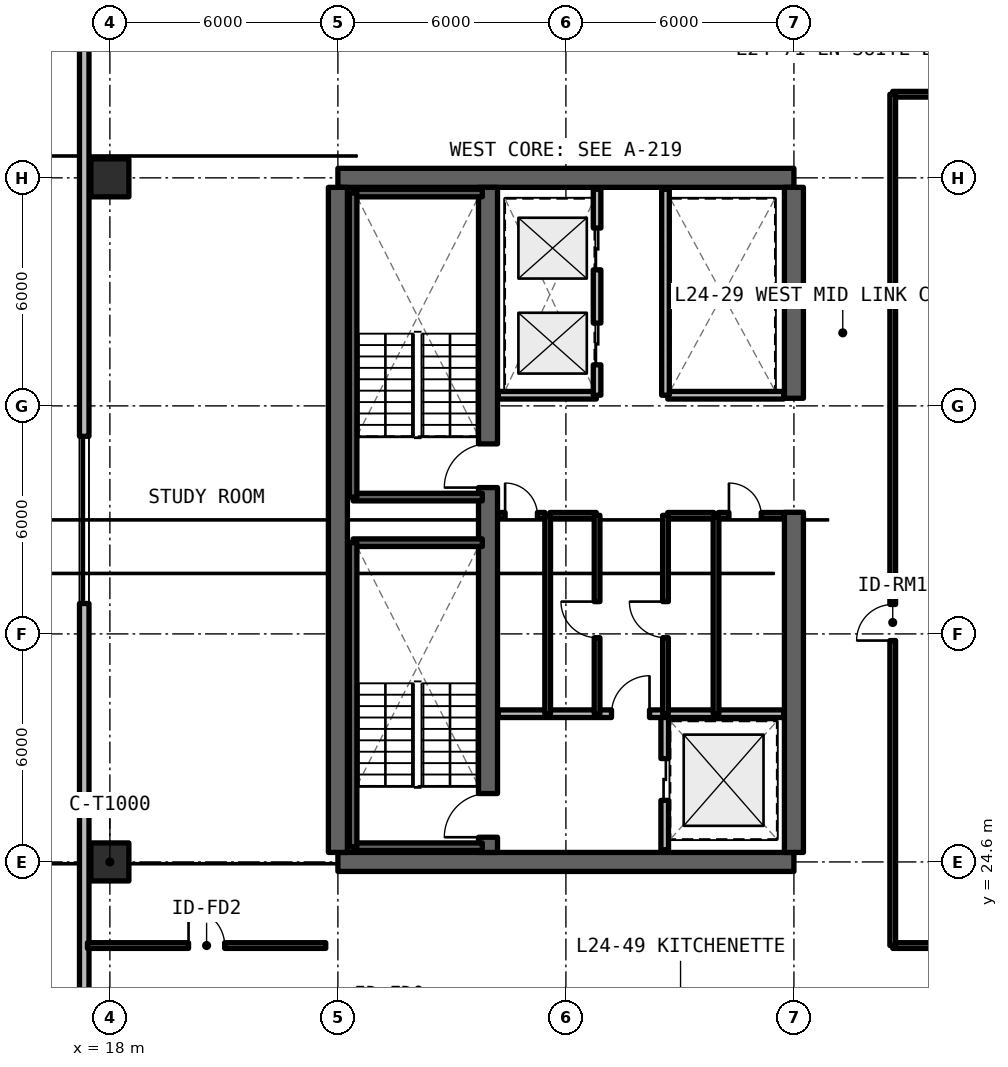
"""IFC4 building model, lengths in metres.
Left out: names, types, materials, properties, quantities, classifications, styles, units other than length and angle.
Written with IfcOpenShell. Run it as: python <this file> out.ifc"""

import sys

from ifc_helpers import new_model, si_unit, direction, frame, frame_2d, origin, origin_2d, place, context, subcontext, project, spatial, rectangle, extrude, element, fill, save


model = new_model("IFC4")
c1 = context("Model", 3, precision=1e-05, world=origin(), true_north=direction((0.0, 1.0)))
c2 = subcontext(c1, "Body", "Model", "MODEL_VIEW")
j1 = project(units=[si_unit("LENGTHUNIT", "METRE"), si_unit("PLANEANGLEUNIT", "RADIAN")], contexts=[c1])
p1 = place(None, origin())
s1 = spatial("IfcSite", under=j1, at=p1, CompositionType="ELEMENT")
p2 = place(p1, origin())
s2 = spatial("IfcBuilding", under=s1, at=p2, CompositionType="ELEMENT")
p3 = place(p2, frame((0.0, 0.0, 88.77)))
s3 = spatial("IfcBuildingStorey", under=s2, at=p3, CompositionType="ELEMENT", Elevation=88.77)
for number, where, z_axis, x_axis in (
    (1, (24.0, 24.6, 0.0), (0.0, 0.0, 1.0), (1.0, 0.0, 0.0)),
    (2, (36.0, 42.6, 0.0), (0.0, 0.0, 1.0), (-1.0, 0.0, 0.0)),
):
    element("IfcWall", number, at=place(p3, frame(where, z_axis=z_axis, x_axis=x_axis)), inside=s3, PredefinedType="SHEAR", context=c2, shape_type="SweptSolid", body=[
        extrude(rectangle(XDim=12.0, YDim=0.5, at=frame_2d((6.0, 0.0))), origin(), (0.0, 0.0, 1.0), 3.3),
    ])
p4 = place(p3, frame((24.0, 24.85, 0.0), z_axis=(0.0, 0.0, 1.0), x_axis=(0.0, 1.0, 0.0)))
e3 = element("IfcWall", 3, at=p4, inside=s3, PredefinedType="SHEAR", context=c2, shape_type="SweptSolid", body=[
    extrude(rectangle(XDim=17.5, YDim=0.5, at=frame_2d((8.75, 0.0))), origin(), (0.0, 0.0, 1.0), 3.3),
])
p5 = place(p3, frame((36.0, 24.85, 0.0), z_axis=(0.0, 0.0, 1.0), x_axis=(0.0, 1.0, 0.0)))
e4 = element("IfcWall", 4, at=p5, inside=s3, PredefinedType="SHEAR", context=c2, shape_type="SweptSolid", body=[
    extrude(rectangle(XDim=8.95, YDim=0.5, at=frame_2d((4.475, 0.0))), origin(), (0.0, 0.0, 1.0), 3.3),
])
p6 = place(p3, frame((36.0, 36.8, 0.0), z_axis=(0.0, 0.0, 1.0), x_axis=(0.0, 1.0, 0.0)))
e5 = element("IfcWall", 5, at=p6, inside=s3, PredefinedType="SHEAR", context=c2, shape_type="SweptSolid", body=[
    extrude(rectangle(XDim=5.55, YDim=0.5, at=frame_2d((2.775, 0.0))), origin(), (0.0, 0.0, 1.0), 3.3),
])
p7 = place(p3, frame((27.95, 24.85, 0.0), z_axis=(0.0, 0.0, 1.0), x_axis=(0.0, 1.0, 0.0)))
e6 = element("IfcWall", 6, at=p7, inside=s3, PredefinedType="SHEAR", context=c2, shape_type="SweptSolid", body=[
    extrude(rectangle(XDim=17.5, YDim=0.5, at=frame_2d((8.75, 0.0))), origin(), (0.0, 0.0, 1.0), 3.3),
])
p8 = place(p7, frame((0.4, 0.0, 0.0)))
e7 = element("IfcOpeningElement", 7, at=p8, cuts=e6, PredefinedType="OPENING", context=c2, shape_type="SweptSolid", body=[
    extrude(rectangle(XDim=1.15, YDim=2.15, at=frame_2d((0.575, 1.075))), frame((0.0, 0.26, 0.0), z_axis=(0.0, -1.0, 0.0), x_axis=(1.0, 0.0, 0.0)), (0.0, 0.0, 1.0), 0.52),
])
p9 = place(p7, frame((9.6, 0.0, 0.0)))
e8 = element("IfcOpeningElement", 8, at=p9, cuts=e6, PredefinedType="OPENING", context=c2, shape_type="SweptSolid", body=[
    extrude(rectangle(XDim=1.15, YDim=2.15, at=frame_2d((0.575, 1.075))), frame((0.0, 0.26, 0.0), z_axis=(0.0, -1.0, 0.0), x_axis=(1.0, 0.0, 0.0)), (0.0, 0.0, 1.0), 0.52),
])
for number, where, z_axis, x_axis in (
    (9, (18.0, 24.6, 0.0), (0.0, 0.0, 1.0), (1.0, 0.0, 0.0)),
    (10, (18.0, 42.6, 0.0), (0.0, 0.0, 1.0), (1.0, 0.0, 0.0)),
):
    element("IfcColumn", number, at=place(p3, frame(where, z_axis=z_axis, x_axis=x_axis)), inside=s3, PredefinedType="COLUMN", context=c2, shape_type="SweptSolid", body=[
        extrude(rectangle(XDim=1.0, YDim=1.0, at=origin_2d()), origin(), (0.0, 0.0, 1.0), 3.3),
    ])
p10 = place(p3, frame((17.325, 53.348, 0.0), z_axis=(0.0, 0.0, 1.0), x_axis=(0.0, -1.0, 0.0)))
e11 = element("IfcWall", 11, at=p10, inside=s3, PredefinedType="SOLIDWALL", context=c2, shape_type="SweptSolid", body=[
    extrude(rectangle(XDim=39.496, YDim=0.25, at=frame_2d((19.748, 0.0))), origin(), (0.0, 0.0, 1.0), 3.08),
])
p11 = place(p10, frame((1.698, 0.0, 0.0)))
e12 = element("IfcOpeningElement", 12, at=p11, cuts=e11, PredefinedType="OPENING", context=c2, shape_type="SweptSolid", body=[
    extrude(rectangle(XDim=1.1, YDim=2.15, at=frame_2d((0.55, 1.075))), frame((0.0, 0.135, 0.0), z_axis=(0.0, -1.0, 0.0), x_axis=(1.0, 0.0, 0.0)), (0.0, 0.0, 1.0), 0.27),
])
p12 = place(p10, frame((17.548, 0.0, 0.78)))
e13 = element("IfcOpeningElement", 13, at=p12, cuts=e11, PredefinedType="OPENING", context=c2, shape_type="SweptSolid", body=[
    extrude(rectangle(XDim=4.4, YDim=1.66, at=frame_2d((2.2, 0.83))), frame((0.0, 0.135, 0.0), z_axis=(0.0, -1.0, 0.0), x_axis=(1.0, 0.0, 0.0)), (0.0, 0.0, 1.0), 0.27),
])
p13 = place(p10, frame((35.642, 0.0, 0.78)))
e14 = element("IfcOpeningElement", 14, at=p13, cuts=e11, PredefinedType="OPENING", context=c2, shape_type="SweptSolid", body=[
    extrude(rectangle(XDim=1.4, YDim=1.65, at=frame_2d((0.7, 0.825))), frame((0.0, 0.135, 0.0), z_axis=(0.0, -1.0, 0.0), x_axis=(1.0, 0.0, 0.0)), (0.0, 0.0, 1.0), 0.27),
])
p14 = place(p3, frame((32.6, 24.92, 0.0), z_axis=(0.0, 0.0, 1.0), x_axis=(0.0, 1.0, 0.0)))
e15 = element("IfcWall", 15, at=p14, inside=s3, PredefinedType="SOLIDWALL", context=c2, shape_type="SweptSolid", body=[
    extrude(rectangle(XDim=3.58, YDim=0.2, at=frame_2d((1.79, 0.0))), origin(), (0.0, 0.0, 1.0), 2.35),
])
p15 = place(p14, frame((1.3, 0.0, 0.0)))
e16 = element("IfcOpeningElement", 16, at=p15, cuts=e15, PredefinedType="OPENING", context=c2, shape_type="SweptSolid", body=[
    extrude(rectangle(XDim=1.1, YDim=2.2, at=frame_2d((0.55, 1.1))), frame((0.0, 0.11, 0.0), z_axis=(0.0, -1.0, 0.0), x_axis=(1.0, 0.0, 0.0)), (0.0, 0.0, 1.0), 0.22),
])
p16 = place(p3, frame((28.22, 28.5, 0.0), z_axis=(0.0, 0.0, 1.0), x_axis=(1.0, 0.0, 0.0)))
e17 = element("IfcWall", 17, at=p16, inside=s3, PredefinedType="SOLIDWALL", context=c2, shape_type="SweptSolid", body=[
    extrude(rectangle(XDim=7.51, YDim=0.2, at=frame_2d((3.755, 0.0))), origin(), (0.0, 0.0, 1.0), 2.35),
])
p17 = place(p16, frame((2.98, 0.0, 0.0)))
e18 = element("IfcOpeningElement", 18, at=p17, cuts=e17, PredefinedType="OPENING", context=c2, shape_type="SweptSolid", body=[
    extrude(rectangle(XDim=1.0, YDim=2.15, at=frame_2d((0.5, 1.075))), frame((0.0, 0.11, 0.0), z_axis=(0.0, -1.0, 0.0), x_axis=(1.0, 0.0, 0.0)), (0.0, 0.0, 1.0), 0.22),
])
p18 = place(p3, frame((29.52, 28.5, 0.0), z_axis=(0.0, 0.0, 1.0), x_axis=(0.0, 1.0, 0.0)))
e19 = element("IfcWall", 19, at=p18, inside=s3, PredefinedType="SOLIDWALL", context=c2, shape_type="SweptSolid", body=[
    extrude(rectangle(XDim=5.22, YDim=0.15, at=frame_2d((2.61, 0.0))), origin(), (0.0, 0.0, 1.0), 2.35),
])
p19 = place(p3, frame((28.22, 33.72, 0.0), z_axis=(0.0, 0.0, 1.0), x_axis=(1.0, 0.0, 0.0)))
e20 = element("IfcWall", 20, at=p19, inside=s3, PredefinedType="SOLIDWALL", context=c2, shape_type="SweptSolid", body=[
    extrude(rectangle(XDim=1.23, YDim=0.15, at=frame_2d((0.615, 0.0))), origin(), (0.0, 0.0, 1.0), 2.35),
])
p20 = place(p19, frame((0.18, 0.0, 0.0)))
e21 = element("IfcOpeningElement", 21, at=p20, cuts=e20, PredefinedType="OPENING", context=c2, shape_type="SweptSolid", body=[
    extrude(rectangle(XDim=0.85, YDim=2.1, at=frame_2d((0.425, 1.05))), frame((0.0, 0.085, 0.0), z_axis=(0.0, -1.0, 0.0), x_axis=(1.0, 0.0, 0.0)), (0.0, 0.0, 1.0), 0.17),
])
p21 = place(p3, frame((29.58, 33.72, 0.0), z_axis=(0.0, 0.0, 1.0), x_axis=(1.0, 0.0, 0.0)))
e22 = element("IfcWall", 22, at=p21, inside=s3, PredefinedType="SOLIDWALL", context=c2, shape_type="SweptSolid", body=[
    extrude(rectangle(XDim=1.22, YDim=0.15, at=frame_2d((0.61, 0.0))), origin(), (0.0, 0.0, 1.0), 2.35),
])
p22 = place(p3, frame((30.82, 28.5, 0.0), z_axis=(0.0, 0.0, 1.0), x_axis=(0.0, 1.0, 0.0)))
e23 = element("IfcWall", 23, at=p22, inside=s3, PredefinedType="SOLIDWALL", context=c2, shape_type="SweptSolid", body=[
    extrude(rectangle(XDim=5.22, YDim=0.15, at=frame_2d((2.61, 0.0))), origin(), (0.0, 0.0, 1.0), 2.35),
])
p23 = place(p22, frame((2.0, 0.0, 0.0)))
e24 = element("IfcOpeningElement", 24, at=p23, cuts=e23, PredefinedType="OPENING", context=c2, shape_type="SweptSolid", body=[
    extrude(rectangle(XDim=0.95, YDim=2.15, at=frame_2d((0.475, 1.075))), frame((0.0, 0.085, 0.0), z_axis=(0.0, -1.0, 0.0), x_axis=(1.0, 0.0, 0.0)), (0.0, 0.0, 1.0), 0.17),
])
p24 = place(p3, frame((33.95, 28.5, 0.0), z_axis=(0.0, 0.0, 1.0), x_axis=(0.0, 1.0, 0.0)))
e25 = element("IfcWall", 25, at=p24, inside=s3, PredefinedType="SOLIDWALL", context=c2, shape_type="SweptSolid", body=[
    extrude(rectangle(XDim=5.22, YDim=0.15, at=frame_2d((2.61, 0.0))), origin(), (0.0, 0.0, 1.0), 2.35),
])
p25 = place(p3, frame((32.68, 33.72, 0.0), z_axis=(0.0, 0.0, 1.0), x_axis=(1.0, 0.0, 0.0)))
e26 = element("IfcWall", 26, at=p25, inside=s3, PredefinedType="SOLIDWALL", context=c2, shape_type="SweptSolid", body=[
    extrude(rectangle(XDim=1.21, YDim=0.15, at=frame_2d((0.605, 0.0))), origin(), (0.0, 0.0, 1.0), 2.35),
])
p26 = place(p3, frame((34.01, 33.72, 0.0), z_axis=(0.0, 0.0, 1.0), x_axis=(1.0, 0.0, 0.0)))
e27 = element("IfcWall", 27, at=p26, inside=s3, PredefinedType="SOLIDWALL", context=c2, shape_type="SweptSolid", body=[
    extrude(rectangle(XDim=1.72, YDim=0.15, at=frame_2d((0.86, 0.0))), origin(), (0.0, 0.0, 1.0), 2.35),
])
p27 = place(p26, frame((0.28, 0.0, 0.0)))
e28 = element("IfcOpeningElement", 28, at=p27, cuts=e27, PredefinedType="OPENING", context=c2, shape_type="SweptSolid", body=[
    extrude(rectangle(XDim=0.85, YDim=2.1, at=frame_2d((0.425, 1.05))), frame((0.0, 0.085, 0.0), z_axis=(0.0, -1.0, 0.0), x_axis=(1.0, 0.0, 0.0)), (0.0, 0.0, 1.0), 0.17),
])
p28 = place(p3, frame((32.62, 28.5, 0.0), z_axis=(0.0, 0.0, 1.0), x_axis=(0.0, 1.0, 0.0)))
e29 = element("IfcWall", 29, at=p28, inside=s3, PredefinedType="SOLIDWALL", context=c2, shape_type="SweptSolid", body=[
    extrude(rectangle(XDim=5.22, YDim=0.15, at=frame_2d((2.61, 0.0))), origin(), (0.0, 0.0, 1.0), 2.35),
])
p29 = place(p28, frame((2.0, 0.0, 0.0)))
e30 = element("IfcOpeningElement", 30, at=p29, cuts=e29, PredefinedType="OPENING", context=c2, shape_type="SweptSolid", body=[
    extrude(rectangle(XDim=0.95, YDim=2.15, at=frame_2d((0.475, 1.075))), frame((0.0, 0.085, 0.0), z_axis=(0.0, -1.0, 0.0), x_axis=(1.0, 0.0, 0.0)), (0.0, 0.0, 1.0), 0.17),
])
p30 = place(p3, frame((28.22, 36.88, 0.0), z_axis=(0.0, 0.0, 1.0), x_axis=(1.0, 0.0, 0.0)))
e31 = element("IfcWall", 31, at=p30, inside=s3, PredefinedType="SOLIDWALL", context=c2, shape_type="SweptSolid", body=[
    extrude(rectangle(XDim=2.58, YDim=0.2, at=frame_2d((1.29, 0.0))), origin(), (0.0, 0.0, 1.0), 2.35),
])
p31 = place(p3, frame((30.82, 36.88, 0.0), z_axis=(0.0, 0.0, 1.0), x_axis=(0.0, 1.0, 0.0)))
e32 = element("IfcWall", 32, at=p31, inside=s3, PredefinedType="SOLIDWALL", context=c2, shape_type="SweptSolid", body=[
    extrude(rectangle(XDim=5.42, YDim=0.2, at=frame_2d((2.71, 0.0))), origin(), (0.0, 0.0, 1.0), 2.35),
])
p32 = place(p31, frame((0.8, 0.0, 0.0)))
e33 = element("IfcOpeningElement", 33, at=p32, cuts=e32, PredefinedType="OPENING", context=c2, shape_type="SweptSolid", body=[
    extrude(rectangle(XDim=1.1, YDim=2.2, at=frame_2d((0.55, 1.1))), frame((0.0, 0.11, 0.0), z_axis=(0.0, -1.0, 0.0), x_axis=(1.0, 0.0, 0.0)), (0.0, 0.0, 1.0), 0.22),
])
p33 = place(p31, frame((3.3, 0.0, 0.0)))
e34 = element("IfcOpeningElement", 34, at=p33, cuts=e32, PredefinedType="OPENING", context=c2, shape_type="SweptSolid", body=[
    extrude(rectangle(XDim=1.1, YDim=2.2, at=frame_2d((0.55, 1.1))), frame((0.0, 0.11, 0.0), z_axis=(0.0, -1.0, 0.0), x_axis=(1.0, 0.0, 0.0)), (0.0, 0.0, 1.0), 0.22),
])
p34 = place(p3, frame((32.68, 36.88, 0.0), z_axis=(0.0, 0.0, 1.0), x_axis=(1.0, 0.0, 0.0)))
e35 = element("IfcWall", 35, at=p34, inside=s3, PredefinedType="SOLIDWALL", context=c2, shape_type="SweptSolid", body=[
    extrude(rectangle(XDim=3.05, YDim=0.2, at=frame_2d((1.525, 0.0))), origin(), (0.0, 0.0, 1.0), 2.35),
])
p35 = place(p3, frame((32.62, 36.88, 0.0), z_axis=(0.0, 0.0, 1.0), x_axis=(0.0, 1.0, 0.0)))
e36 = element("IfcWall", 36, at=p35, inside=s3, PredefinedType="SOLIDWALL", context=c2, shape_type="SweptSolid", body=[
    extrude(rectangle(XDim=5.42, YDim=0.2, at=frame_2d((2.71, 0.0))), origin(), (0.0, 0.0, 1.0), 2.35),
])
for number, where, z_axis, x_axis in (
    (37, (38.6, 22.4, 0.0), (0.0, 0.0, 1.0), (1.0, 0.0, 0.0)),
    (38, (38.6, 44.8, 0.0), (0.0, 0.0, 1.0), (1.0, 0.0, 0.0)),
):
    element("IfcWall", number, at=place(p3, frame(where, z_axis=z_axis, x_axis=x_axis)), inside=s3, PredefinedType="SOLIDWALL", context=c2, shape_type="SweptSolid", body=[
        extrude(rectangle(XDim=8.25, YDim=0.15, at=frame_2d((4.125, 0.0))), origin(), (0.0, 0.0, 1.0), 2.35),
    ])
p36 = place(p3, frame((38.6, 22.4, 0.0), z_axis=(0.0, 0.0, 1.0), x_axis=(0.0, 1.0, 0.0)))
e39 = element("IfcWall", 39, at=p36, inside=s3, PredefinedType="SOLIDWALL", context=c2, shape_type="SweptSolid", body=[
    extrude(rectangle(XDim=22.4, YDim=0.15, at=frame_2d((11.2, 0.0))), origin(), (0.0, 0.0, 1.0), 2.35),
])
p37 = place(p36, frame((8.025, 0.0, 0.0)))
e40 = element("IfcOpeningElement", 40, at=p37, cuts=e39, PredefinedType="OPENING", context=c2, shape_type="SweptSolid", body=[
    extrude(rectangle(XDim=0.95, YDim=2.15, at=frame_2d((0.475, 1.075))), frame((0.0, 0.085, 0.0), z_axis=(0.0, -1.0, 0.0), x_axis=(1.0, 0.0, 0.0)), (0.0, 0.0, 1.0), 0.17),
])
p38 = place(p3, frame((17.41, 22.4, 0.0), z_axis=(0.0, 0.0, 1.0), x_axis=(1.0, 0.0, 0.0)))
e41 = element("IfcWall", 41, at=p38, inside=s3, PredefinedType="SOLIDWALL", context=c2, shape_type="SweptSolid", body=[
    extrude(rectangle(XDim=6.27, YDim=0.15, at=frame_2d((3.135, 0.0))), origin(), (0.0, 0.0, 1.0), 2.35),
])
p39 = place(p38, frame((2.66, 0.0, 0.0)))
e42 = element("IfcOpeningElement", 42, at=p39, cuts=e41, PredefinedType="OPENING", context=c2, shape_type="SweptSolid", body=[
    extrude(rectangle(XDim=0.95, YDim=2.15, at=frame_2d((0.475, 1.075))), frame((0.0, 0.085, 0.0), z_axis=(0.0, -1.0, 0.0), x_axis=(1.0, 0.0, 0.0)), (0.0, 0.0, 1.0), 0.17),
])
for number, where, z_axis, x_axis in (
    (43, (24.4, 25.0, 0.0), (0.0, 0.0, 1.0), (1.0, 0.0, 0.0)),
    (44, (27.8, 33.0, 0.0), (0.0, 0.0, 1.0), (-1.0, 0.0, 0.0)),
):
    element("IfcWall", number, at=place(p3, frame(where, z_axis=z_axis, x_axis=x_axis)), inside=s3, PredefinedType="SOLIDWALL", context=c2, shape_type="SweptSolid", body=[
        extrude(rectangle(XDim=3.4, YDim=0.2, at=frame_2d((1.7, 0.0))), origin(), (0.0, 0.0, 1.0), 3.3),
    ])
p40 = place(p3, frame((24.4, 33.0, 0.0), z_axis=(0.0, 0.0, 1.0), x_axis=(0.0, -1.0, 0.0)))
e45 = element("IfcWall", 45, at=p40, inside=s3, PredefinedType="SOLIDWALL", context=c2, shape_type="SweptSolid", body=[
    extrude(rectangle(XDim=8.0, YDim=0.2, at=frame_2d((4.0, 0.0))), origin(), (0.0, 0.0, 1.0), 3.3),
])
for number, where, z_axis, x_axis in (
    (46, (24.4, 34.2, 0.0), (0.0, 0.0, 1.0), (1.0, 0.0, 0.0)),
    (47, (27.8, 42.2, 0.0), (0.0, 0.0, 1.0), (-1.0, 0.0, 0.0)),
):
    element("IfcWall", number, at=place(p3, frame(where, z_axis=z_axis, x_axis=x_axis)), inside=s3, PredefinedType="SOLIDWALL", context=c2, shape_type="SweptSolid", body=[
        extrude(rectangle(XDim=3.4, YDim=0.2, at=frame_2d((1.7, 0.0))), origin(), (0.0, 0.0, 1.0), 3.3),
    ])
p41 = place(p3, frame((24.4, 42.2, 0.0), z_axis=(0.0, 0.0, 1.0), x_axis=(0.0, -1.0, 0.0)))
e48 = element("IfcWall", 48, at=p41, inside=s3, PredefinedType="SOLIDWALL", context=c2, shape_type="SweptSolid", body=[
    extrude(rectangle(XDim=8.0, YDim=0.2, at=frame_2d((4.0, 0.0))), origin(), (0.0, 0.0, 1.0), 3.3),
])
p42 = place(p12, origin())
e49 = element("IfcWindow", 49, at=p42, inside=s3, PartitioningType="SINGLE_PANEL", PredefinedType="WINDOW", context=c2, shape_type="SweptSolid", body=[
    extrude(rectangle(XDim=4.4, YDim=1.66, at=frame_2d((2.2, 0.83))), frame((0.0, 0.03, 0.0), z_axis=(0.0, -1.0, 0.0), x_axis=(1.0, 0.0, 0.0)), (0.0, 0.0, 1.0), 0.06),
])
fill(e13, e49)
p43 = place(p15, origin())
e50 = element("IfcDoor", 50, at=p43, inside=s3, OperationType="SLIDING_TO_LEFT", PredefinedType="DOOR", context=c2, shape_type="SweptSolid", body=[
    extrude(rectangle(XDim=1.1, YDim=2.2, at=frame_2d((0.55, 1.1))), frame((0.0, 0.025, 0.0), z_axis=(0.0, -1.0, 0.0), x_axis=(1.0, 0.0, 0.0)), (0.0, 0.0, 1.0), 0.05),
])
fill(e16, e50)
p44 = place(p17, origin())
e51 = element("IfcDoor", 51, at=p44, inside=s3, OperationType="SINGLE_SWING_RIGHT", PredefinedType="DOOR", context=c2, shape_type="SweptSolid", body=[
    extrude(rectangle(XDim=1.0, YDim=2.15, at=frame_2d((0.5, 1.075))), frame((0.0, 0.025, 0.0), z_axis=(0.0, -1.0, 0.0), x_axis=(1.0, 0.0, 0.0)), (0.0, 0.0, 1.0), 0.05),
])
fill(e18, e51)
p45 = place(p20, origin())
e52 = element("IfcDoor", 52, at=p45, inside=s3, OperationType="SINGLE_SWING_LEFT", PredefinedType="DOOR", context=c2, shape_type="SweptSolid", body=[
    extrude(rectangle(XDim=0.85, YDim=2.1, at=frame_2d((0.425, 1.05))), frame((0.0, 0.025, 0.0), z_axis=(0.0, -1.0, 0.0), x_axis=(1.0, 0.0, 0.0)), (0.0, 0.0, 1.0), 0.05),
])
fill(e21, e52)
p46 = place(p23, origin())
e53 = element("IfcDoor", 53, at=p46, inside=s3, OperationType="SINGLE_SWING_RIGHT", PredefinedType="DOOR", context=c2, shape_type="SweptSolid", body=[
    extrude(rectangle(XDim=0.95, YDim=2.15, at=frame_2d((0.475, 1.075))), frame((0.0, 0.025, 0.0), z_axis=(0.0, -1.0, 0.0), x_axis=(1.0, 0.0, 0.0)), (0.0, 0.0, 1.0), 0.05),
])
fill(e24, e53)
p47 = place(p27, origin())
e54 = element("IfcDoor", 54, at=p47, inside=s3, OperationType="SINGLE_SWING_LEFT", PredefinedType="DOOR", context=c2, shape_type="SweptSolid", body=[
    extrude(rectangle(XDim=0.85, YDim=2.1, at=frame_2d((0.425, 1.05))), frame((0.0, 0.025, 0.0), z_axis=(0.0, -1.0, 0.0), x_axis=(1.0, 0.0, 0.0)), (0.0, 0.0, 1.0), 0.05),
])
fill(e28, e54)
p48 = place(p29, origin())
e55 = element("IfcDoor", 55, at=p48, inside=s3, OperationType="SINGLE_SWING_RIGHT", PredefinedType="DOOR", context=c2, shape_type="SweptSolid", body=[
    extrude(rectangle(XDim=0.95, YDim=2.15, at=frame_2d((0.475, 1.075))), frame((0.0, 0.025, 0.0), z_axis=(0.0, -1.0, 0.0), x_axis=(1.0, 0.0, 0.0)), (0.0, 0.0, 1.0), 0.05),
])
fill(e30, e55)
p49 = place(p32, origin())
e56 = element("IfcDoor", 56, at=p49, inside=s3, OperationType="SLIDING_TO_LEFT", PredefinedType="DOOR", context=c2, shape_type="SweptSolid", body=[
    extrude(rectangle(XDim=1.1, YDim=2.2, at=frame_2d((0.55, 1.1))), frame((0.0, 0.025, 0.0), z_axis=(0.0, -1.0, 0.0), x_axis=(1.0, 0.0, 0.0)), (0.0, 0.0, 1.0), 0.05),
])
fill(e33, e56)
p50 = place(p33, origin())
e57 = element("IfcDoor", 57, at=p50, inside=s3, OperationType="SLIDING_TO_RIGHT", PredefinedType="DOOR", context=c2, shape_type="SweptSolid", body=[
    extrude(rectangle(XDim=1.1, YDim=2.2, at=frame_2d((0.55, 1.1))), frame((0.0, 0.025, 0.0), z_axis=(0.0, -1.0, 0.0), x_axis=(1.0, 0.0, 0.0)), (0.0, 0.0, 1.0), 0.05),
])
fill(e34, e57)
p51 = place(p37, origin())
e58 = element("IfcDoor", 58, at=p51, inside=s3, OperationType="SINGLE_SWING_LEFT", PredefinedType="DOOR", context=c2, shape_type="SweptSolid", body=[
    extrude(rectangle(XDim=0.95, YDim=2.15, at=frame_2d((0.475, 1.075))), frame((0.0, 0.025, 0.0), z_axis=(0.0, -1.0, 0.0), x_axis=(1.0, 0.0, 0.0)), (0.0, 0.0, 1.0), 0.05),
])
fill(e40, e58)
p52 = place(p39, origin())
e59 = element("IfcDoor", 59, at=p52, inside=s3, OperationType="SINGLE_SWING_LEFT", PredefinedType="DOOR", context=c2, shape_type="SweptSolid", body=[
    extrude(rectangle(XDim=0.95, YDim=2.15, at=frame_2d((0.475, 1.075))), frame((0.0, 0.025, 0.0), z_axis=(0.0, -1.0, 0.0), x_axis=(1.0, 0.0, 0.0)), (0.0, 0.0, 1.0), 0.05),
])
fill(e42, e59)
p53 = place(p8, origin())
e60 = element("IfcDoor", 60, at=p53, inside=s3, OperationType="SINGLE_SWING_LEFT", PredefinedType="DOOR", context=c2, shape_type="SweptSolid", body=[
    extrude(rectangle(XDim=1.15, YDim=2.15, at=frame_2d((0.575, 1.075))), frame((0.0, 0.025, 0.0), z_axis=(0.0, -1.0, 0.0), x_axis=(1.0, 0.0, 0.0)), (0.0, 0.0, 1.0), 0.05),
])
fill(e7, e60)
p54 = place(p9, origin())
e61 = element("IfcDoor", 61, at=p54, inside=s3, OperationType="SINGLE_SWING_RIGHT", PredefinedType="DOOR", context=c2, shape_type="SweptSolid", body=[
    extrude(rectangle(XDim=1.15, YDim=2.15, at=frame_2d((0.575, 1.075))), frame((0.0, 0.025, 0.0), z_axis=(0.0, -1.0, 0.0), x_axis=(1.0, 0.0, 0.0)), (0.0, 0.0, 1.0), 0.05),
])
fill(e8, e61)
save(model, sys.argv[1])
